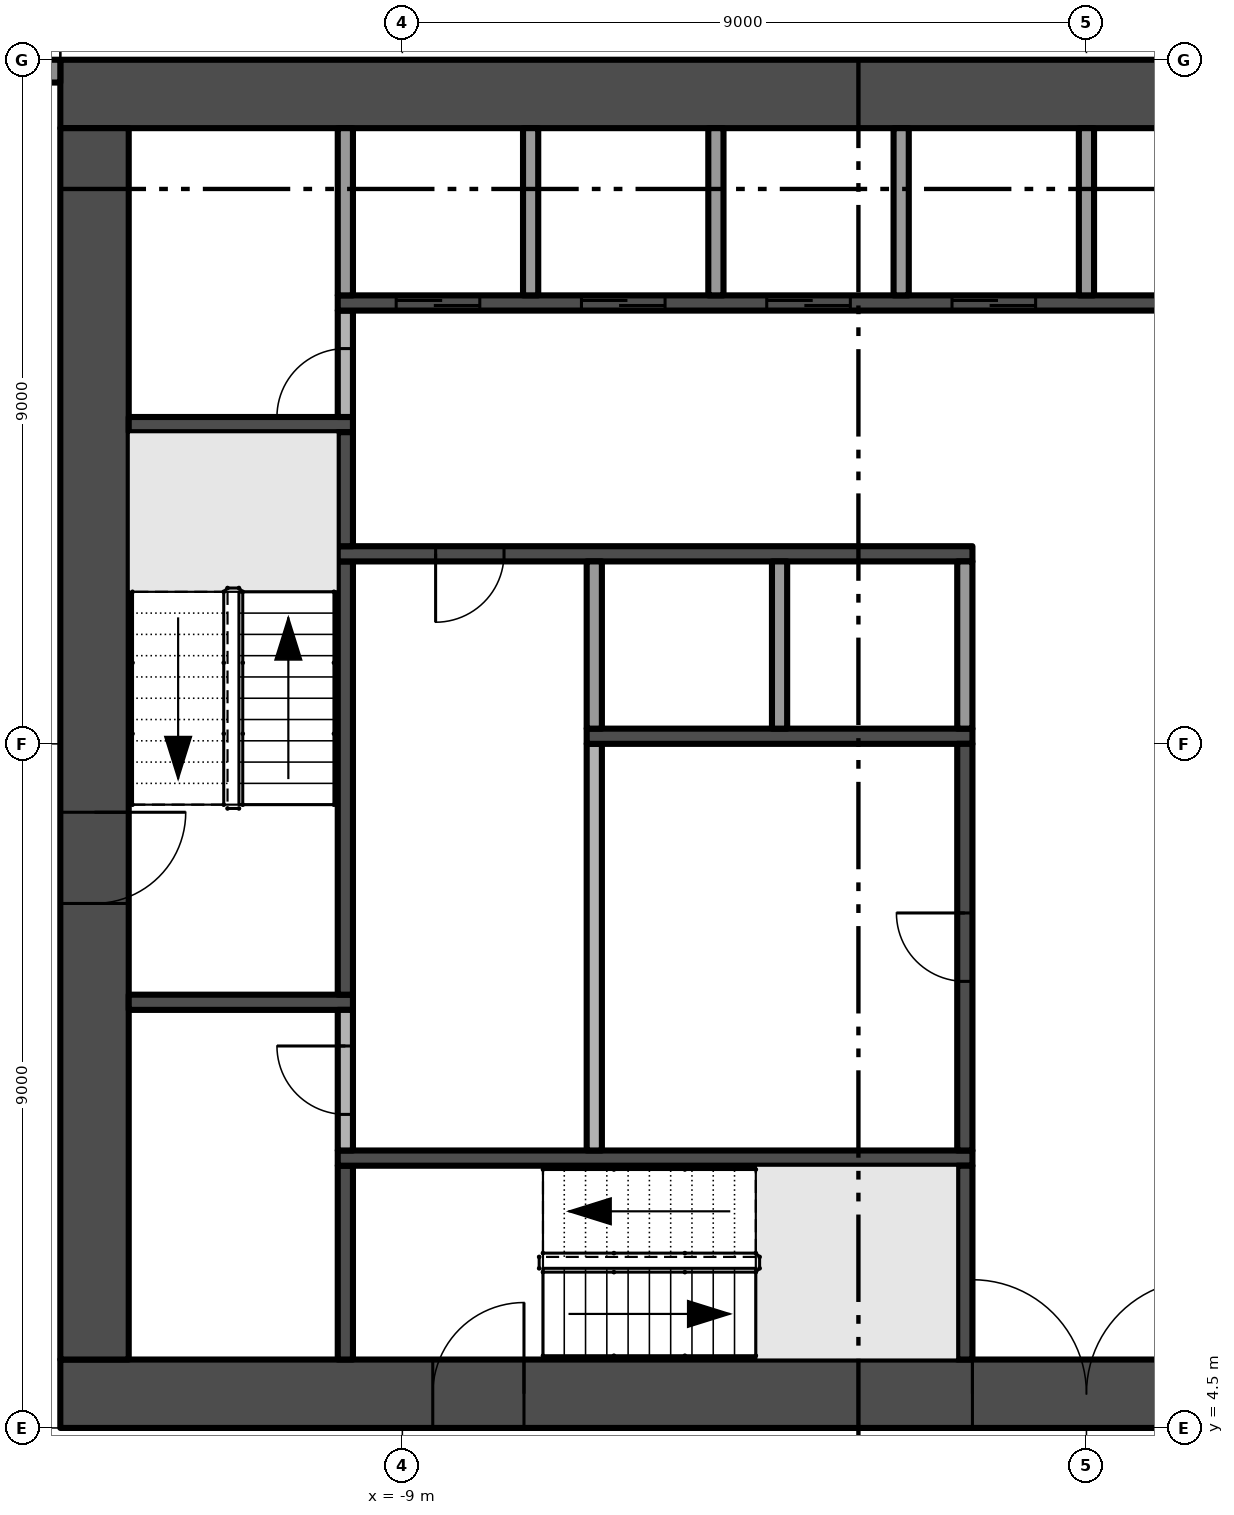
"""IFC4 building model, lengths in metres.
Left out: names, types, materials, properties, quantities, classifications, styles, units other than length and angle.
Written with IfcOpenShell. Run it as: python <this file> out.ifc"""

import sys

from ifc_helpers import new_model, si_unit, direction, frame, frame_2d, origin, place, context, subcontext, project, spatial, rectangle, extrude, element, fill, save


model = new_model("IFC4")
c1 = context("Model", 3, precision=1e-05, world=origin(), true_north=direction((0.0, 1.0)))
c2 = subcontext(c1, "Body", "Model", "MODEL_VIEW")
j1 = project(units=[si_unit("LENGTHUNIT", "METRE"), si_unit("PLANEANGLEUNIT", "RADIAN")], contexts=[c1])
p1 = place(None, origin())
s1 = spatial("IfcSite", under=j1, at=p1, CompositionType="ELEMENT")
p2 = place(p1, origin())
s2 = spatial("IfcBuilding", under=s1, at=p2, CompositionType="ELEMENT")
p3 = place(p2, frame((0.0, 0.0, 103.6)))
s3 = spatial("IfcBuildingStorey", under=s2, at=p3, CompositionType="ELEMENT", Elevation=103.6)
p4 = place(p3, frame((-13.5, 4.95, -0.3), z_axis=(0.0, 0.0, 1.0), x_axis=(1.0, 0.0, 0.0)))
e1 = element("IfcWall", 1, at=p4, inside=s3, PredefinedType="SHEAR", context=c2, shape_type="SweptSolid", body=[
    extrude(rectangle(XDim=27.0, YDim=0.9, at=frame_2d((13.5, 0.0))), origin(), (0.0, 0.0, 1.0), 3.8),
])
p5 = place(p4, frame((12.0, 0.0, 0.3)))
e2 = element("IfcOpeningElement", 2, at=p5, cuts=e1, PredefinedType="OPENING", context=c2, shape_type="SweptSolid", body=[
    extrude(rectangle(XDim=3.0, YDim=2.4, at=frame_2d((1.5, 1.2))), frame((0.0, 0.46, 0.0), z_axis=(0.0, -1.0, 0.0), x_axis=(1.0, 0.0, 0.0)), (0.0, 0.0, 1.0), 0.92),
])
p6 = place(p4, frame((4.9, 0.0, 0.3)))
e3 = element("IfcOpeningElement", 3, at=p6, cuts=e1, PredefinedType="OPENING", context=c2, shape_type="SweptSolid", body=[
    extrude(rectangle(XDim=1.2, YDim=2.2, at=frame_2d((0.6, 1.1))), frame((0.0, 0.46, 0.0), z_axis=(0.0, -1.0, 0.0), x_axis=(1.0, 0.0, 0.0)), (0.0, 0.0, 1.0), 0.92),
])
p7 = place(p4, frame((20.75, 0.0, 0.3)))
e4 = element("IfcOpeningElement", 4, at=p7, cuts=e1, PredefinedType="OPENING", context=c2, shape_type="SweptSolid", body=[
    extrude(rectangle(XDim=1.5, YDim=2.2, at=frame_2d((0.75, 1.1))), frame((0.0, 0.46, 0.0), z_axis=(0.0, -1.0, 0.0), x_axis=(1.0, 0.0, 0.0)), (0.0, 0.0, 1.0), 0.92),
])
p8 = place(p4, frame((17.4, 0.0, 0.3)))
e5 = element("IfcOpeningElement", 5, at=p8, cuts=e1, PredefinedType="OPENING", context=c2, shape_type="SweptSolid", body=[
    extrude(rectangle(XDim=1.2, YDim=2.2, at=frame_2d((0.6, 1.1))), frame((0.0, 0.46, 0.0), z_axis=(0.0, -1.0, 0.0), x_axis=(1.0, 0.0, 0.0)), (0.0, 0.0, 1.0), 0.92),
])
p9 = place(p3, frame((13.5, 22.05, -0.3), z_axis=(0.0, 0.0, 1.0), x_axis=(-1.0, 0.0, 0.0)))
e6 = element("IfcWall", 6, at=p9, inside=s3, PredefinedType="SHEAR", context=c2, shape_type="SweptSolid", body=[
    extrude(rectangle(XDim=27.0, YDim=0.9, at=frame_2d((13.5, 0.0))), origin(), (0.0, 0.0, 1.0), 3.8),
])
p10 = place(p3, frame((-13.05, 21.6, -0.3), z_axis=(0.0, 0.0, 1.0), x_axis=(0.0, -1.0, 0.0)))
e7 = element("IfcWall", 7, at=p10, inside=s3, PredefinedType="SHEAR", context=c2, shape_type="SweptSolid", body=[
    extrude(rectangle(XDim=16.2, YDim=0.9, at=frame_2d((8.1, 0.0))), origin(), (0.0, 0.0, 1.0), 3.8),
])
p11 = place(p10, frame((9.0, 0.0, 0.3)))
e8 = element("IfcOpeningElement", 8, at=p11, cuts=e7, PredefinedType="OPENING", context=c2, shape_type="SweptSolid", body=[
    extrude(rectangle(XDim=1.2, YDim=2.2, at=frame_2d((0.6, 1.1))), frame((0.0, 0.46, 0.0), z_axis=(0.0, -1.0, 0.0), x_axis=(1.0, 0.0, 0.0)), (0.0, 0.0, 1.0), 0.92),
])
p12 = place(p3, frame((-17.375, 22.35, 0.0), z_axis=(0.0, 0.0, 1.0), x_axis=(1.0, 0.0, 0.0)))
e9 = element("IfcWall", 9, at=p12, inside=s3, PredefinedType="SOLIDWALL", context=c2, shape_type="SweptSolid", body=[
    extrude(rectangle(XDim=3.875, YDim=0.3, at=frame_2d((1.938, 0.0))), origin(), (0.0, 0.0, 1.0), 3.5),
])
p13 = place(p12, frame((0.325, 0.0, 0.45)))
e10 = element("IfcOpeningElement", 10, at=p13, cuts=e9, PredefinedType="OPENING", context=c2, shape_type="SweptSolid", body=[
    extrude(rectangle(XDim=2.775, YDim=2.65, at=frame_2d((1.387, 1.325))), frame((0.0, 0.16, 0.0), z_axis=(0.0, -1.0, 0.0), x_axis=(1.0, 0.0, 0.0)), (0.0, 0.0, 1.0), 0.32),
])
for number, where, z_axis, x_axis in (
    (11, (-12.6, 10.1, 0.0), (0.0, 0.0, 1.0), (1.0, 0.0, 0.0)),
    (12, (-12.6, 17.7, 0.0), (0.0, 0.0, 1.0), (1.0, 0.0, 0.0)),
):
    element("IfcWall", number, at=place(p3, frame(where, z_axis=z_axis, x_axis=x_axis)), inside=s3, PredefinedType="SHEAR", context=c2, shape_type="SweptSolid", body=[
        extrude(rectangle(XDim=2.95, YDim=0.2, at=frame_2d((1.475, 0.0))), origin(), (0.0, 0.0, 1.0), 3.5),
    ])
p14 = place(p3, frame((-9.75, 5.4, 0.0), z_axis=(0.0, 0.0, 1.0), x_axis=(0.0, 1.0, 0.0)))
e13 = element("IfcWall", 13, at=p14, inside=s3, PredefinedType="SHEAR", context=c2, shape_type="SweptSolid", body=[
    extrude(rectangle(XDim=2.55, YDim=0.2, at=frame_2d((1.275, 0.0))), origin(), (0.0, 0.0, 1.0), 3.5),
])
p15 = place(p3, frame((-9.85, 8.05, 0.0), z_axis=(0.0, 0.0, 1.0), x_axis=(1.0, 0.0, 0.0)))
e14 = element("IfcWall", 14, at=p15, inside=s3, PredefinedType="SHEAR", context=c2, shape_type="SweptSolid", body=[
    extrude(rectangle(XDim=8.35, YDim=0.2, at=frame_2d((4.175, 0.0))), origin(), (0.0, 0.0, 1.0), 3.5),
])
p16 = place(p3, frame((-9.75, 8.15, 0.0), z_axis=(0.0, 0.0, 1.0), x_axis=(0.0, 1.0, 0.0)))
e15 = element("IfcWall", 15, at=p16, inside=s3, PredefinedType="PARTITIONING", context=c2, shape_type="SweptSolid", body=[
    extrude(rectangle(XDim=1.85, YDim=0.2, at=frame_2d((0.925, 0.0))), origin(), (0.0, 0.0, 1.0), 3.5),
])
p17 = place(p16, frame((0.475, 0.0, 0.0)))
e16 = element("IfcOpeningElement", 16, at=p17, cuts=e15, PredefinedType="OPENING", context=c2, shape_type="SweptSolid", body=[
    extrude(rectangle(XDim=0.9, YDim=2.1, at=frame_2d((0.45, 1.05))), frame((0.0, 0.11, 0.0), z_axis=(0.0, -1.0, 0.0), x_axis=(1.0, 0.0, 0.0)), (0.0, 0.0, 1.0), 0.22),
])
p18 = place(p3, frame((-9.75, 10.2, 0.0), z_axis=(0.0, 0.0, 1.0), x_axis=(0.0, 1.0, 0.0)))
e17 = element("IfcWall", 17, at=p18, inside=s3, PredefinedType="SHEAR", context=c2, shape_type="SweptSolid", body=[
    extrude(rectangle(XDim=5.7, YDim=0.2, at=frame_2d((2.85, 0.0))), origin(), (0.0, 0.0, 1.0), 3.5),
])
p19 = place(p3, frame((-1.5, 16.0, 0.0), z_axis=(0.0, 0.0, 1.0), x_axis=(-1.0, 0.0, 0.0)))
e18 = element("IfcWall", 18, at=p19, inside=s3, PredefinedType="SHEAR", context=c2, shape_type="SweptSolid", body=[
    extrude(rectangle(XDim=8.35, YDim=0.2, at=frame_2d((4.175, 0.0))), origin(), (0.0, 0.0, 1.0), 3.5),
])
p20 = place(p19, frame((6.162, 0.0, 0.0)))
e19 = element("IfcOpeningElement", 19, at=p20, cuts=e18, PredefinedType="OPENING", context=c2, shape_type="SweptSolid", body=[
    extrude(rectangle(XDim=0.9, YDim=2.1, at=frame_2d((0.45, 1.05))), frame((0.0, 0.11, 0.0), z_axis=(0.0, -1.0, 0.0), x_axis=(1.0, 0.0, 0.0)), (0.0, 0.0, 1.0), 0.22),
])
p21 = place(p3, frame((-9.75, 16.1, 0.0), z_axis=(0.0, 0.0, 1.0), x_axis=(0.0, 1.0, 0.0)))
e20 = element("IfcWall", 20, at=p21, inside=s3, PredefinedType="SHEAR", context=c2, shape_type="SweptSolid", body=[
    extrude(rectangle(XDim=1.5, YDim=0.2, at=frame_2d((0.75, 0.0))), origin(), (0.0, 0.0, 1.0), 3.5),
])
p22 = place(p3, frame((-9.75, 17.8, 0.0), z_axis=(0.0, 0.0, 1.0), x_axis=(0.0, 1.0, 0.0)))
e21 = element("IfcWall", 21, at=p22, inside=s3, PredefinedType="PARTITIONING", context=c2, shape_type="SweptSolid", body=[
    extrude(rectangle(XDim=1.4, YDim=0.2, at=frame_2d((0.7, 0.0))), origin(), (0.0, 0.0, 1.0), 3.5),
])
p23 = place(p22, origin())
e22 = element("IfcOpeningElement", 22, at=p23, cuts=e21, PredefinedType="OPENING", context=c2, shape_type="SweptSolid", body=[
    extrude(rectangle(XDim=0.9, YDim=2.1, at=frame_2d((0.45, 1.05))), frame((0.0, 0.11, 0.0), z_axis=(0.0, -1.0, 0.0), x_axis=(1.0, 0.0, 0.0)), (0.0, 0.0, 1.0), 0.22),
])
p24 = place(p3, frame((-9.85, 19.3, 0.0), z_axis=(0.0, 0.0, 1.0), x_axis=(1.0, 0.0, 0.0)))
e23 = element("IfcWall", 23, at=p24, inside=s3, PredefinedType="SHEAR", context=c2, shape_type="SweptSolid", body=[
    extrude(rectangle(XDim=19.7, YDim=0.2, at=frame_2d((9.85, 0.0))), origin(), (0.0, 0.0, 1.0), 3.5),
])
p25 = place(p24, frame((0.769, 0.0, 0.0)))
e24 = element("IfcOpeningElement", 24, at=p25, cuts=e23, PredefinedType="OPENING", context=c2, shape_type="SweptSolid", body=[
    extrude(rectangle(XDim=1.1, YDim=2.1, at=frame_2d((0.55, 1.05))), frame((0.0, 0.11, 0.0), z_axis=(0.0, -1.0, 0.0), x_axis=(1.0, 0.0, 0.0)), (0.0, 0.0, 1.0), 0.22),
])
p26 = place(p24, frame((3.206, 0.0, 0.0)))
e25 = element("IfcOpeningElement", 25, at=p26, cuts=e23, PredefinedType="OPENING", context=c2, shape_type="SweptSolid", body=[
    extrude(rectangle(XDim=1.1, YDim=2.1, at=frame_2d((0.55, 1.05))), frame((0.0, 0.11, 0.0), z_axis=(0.0, -1.0, 0.0), x_axis=(1.0, 0.0, 0.0)), (0.0, 0.0, 1.0), 0.22),
])
p27 = place(p24, frame((5.644, 0.0, 0.0)))
e26 = element("IfcOpeningElement", 26, at=p27, cuts=e23, PredefinedType="OPENING", context=c2, shape_type="SweptSolid", body=[
    extrude(rectangle(XDim=1.1, YDim=2.1, at=frame_2d((0.55, 1.05))), frame((0.0, 0.11, 0.0), z_axis=(0.0, -1.0, 0.0), x_axis=(1.0, 0.0, 0.0)), (0.0, 0.0, 1.0), 0.22),
])
p28 = place(p24, frame((8.081, 0.0, 0.0)))
e27 = element("IfcOpeningElement", 27, at=p28, cuts=e23, PredefinedType="OPENING", context=c2, shape_type="SweptSolid", body=[
    extrude(rectangle(XDim=1.1, YDim=2.1, at=frame_2d((0.55, 1.05))), frame((0.0, 0.11, 0.0), z_axis=(0.0, -1.0, 0.0), x_axis=(1.0, 0.0, 0.0)), (0.0, 0.0, 1.0), 0.22),
])
for number, where, z_axis, x_axis in (
    (28, (-9.75, 19.4, 0.0), (0.0, 0.0, 1.0), (0.0, 1.0, 0.0)),
    (29, (-7.312, 19.4, 0.0), (0.0, 0.0, 1.0), (0.0, 1.0, 0.0)),
):
    element("IfcWall", number, at=place(p3, frame(where, z_axis=z_axis, x_axis=x_axis)), inside=s3, PredefinedType="PARTITIONING", context=c2, shape_type="SweptSolid", body=[
        extrude(rectangle(XDim=2.2, YDim=0.2, at=frame_2d((1.1, 0.0))), origin(), (0.0, 0.0, 1.0), 3.5),
    ])
p29 = place(p3, frame((-6.475, 8.15, 0.0), z_axis=(0.0, 0.0, 1.0), x_axis=(0.0, 1.0, 0.0)))
e30 = element("IfcWall", 30, at=p29, inside=s3, PredefinedType="PARTITIONING", context=c2, shape_type="SweptSolid", body=[
    extrude(rectangle(XDim=5.35, YDim=0.2, at=frame_2d((2.675, 0.0))), origin(), (0.0, 0.0, 1.0), 3.5),
])
p30 = place(p3, frame((-6.575, 13.6, 0.0), z_axis=(0.0, 0.0, 1.0), x_axis=(1.0, 0.0, 0.0)))
e31 = element("IfcWall", 31, at=p30, inside=s3, PredefinedType="SHEAR", context=c2, shape_type="SweptSolid", body=[
    extrude(rectangle(XDim=5.075, YDim=0.2, at=frame_2d((2.538, 0.0))), origin(), (0.0, 0.0, 1.0), 3.5),
])
for number, where, z_axis, x_axis in (
    (32, (-6.475, 13.7, 0.0), (0.0, 0.0, 1.0), (0.0, 1.0, 0.0)),
    (33, (-4.875, 19.4, 0.0), (0.0, 0.0, 1.0), (0.0, 1.0, 0.0)),
    (34, (-4.037, 13.7, 0.0), (0.0, 0.0, 1.0), (0.0, 1.0, 0.0)),
    (35, (-2.438, 19.4, 0.0), (0.0, 0.0, 1.0), (0.0, 1.0, 0.0)),
):
    element("IfcWall", number, at=place(p3, frame(where, z_axis=z_axis, x_axis=x_axis)), inside=s3, PredefinedType="PARTITIONING", context=c2, shape_type="SweptSolid", body=[
        extrude(rectangle(XDim=2.2, YDim=0.2, at=frame_2d((1.1, 0.0))), origin(), (0.0, 0.0, 1.0), 3.5),
    ])
p31 = place(p3, frame((-1.6, 5.4, 0.0), z_axis=(0.0, 0.0, 1.0), x_axis=(0.0, 1.0, 0.0)))
e36 = element("IfcWall", 36, at=p31, inside=s3, PredefinedType="SHEAR", context=c2, shape_type="SweptSolid", body=[
    extrude(rectangle(XDim=2.55, YDim=0.2, at=frame_2d((1.275, 0.0))), origin(), (0.0, 0.0, 1.0), 3.5),
])
p32 = place(p3, frame((-1.6, 8.15, 0.0), z_axis=(0.0, 0.0, 1.0), x_axis=(0.0, 1.0, 0.0)))
e37 = element("IfcWall", 37, at=p32, inside=s3, PredefinedType="SHEAR", context=c2, shape_type="SweptSolid", body=[
    extrude(rectangle(XDim=5.35, YDim=0.2, at=frame_2d((2.675, 0.0))), origin(), (0.0, 0.0, 1.0), 3.5),
])
p33 = place(p32, frame((2.225, 0.0, 0.0)))
e38 = element("IfcOpeningElement", 38, at=p33, cuts=e37, PredefinedType="OPENING", context=c2, shape_type="SweptSolid", body=[
    extrude(rectangle(XDim=0.9, YDim=2.1, at=frame_2d((0.45, 1.05))), frame((0.0, 0.11, 0.0), z_axis=(0.0, -1.0, 0.0), x_axis=(1.0, 0.0, 0.0)), (0.0, 0.0, 1.0), 0.22),
])
for number, where, z_axis, x_axis in (
    (39, (-1.6, 13.7, 0.0), (0.0, 0.0, 1.0), (0.0, 1.0, 0.0)),
    (40, (0.0, 19.4, 0.0), (0.0, 0.0, 1.0), (0.0, 1.0, 0.0)),
):
    element("IfcWall", number, at=place(p3, frame(where, z_axis=z_axis, x_axis=x_axis)), inside=s3, PredefinedType="PARTITIONING", context=c2, shape_type="SweptSolid", body=[
        extrude(rectangle(XDim=2.2, YDim=0.2, at=frame_2d((1.1, 0.0))), origin(), (0.0, 0.0, 1.0), 3.5),
    ])
p34 = place(p5, frame((3.0, 0.0, 0.0), z_axis=(0.0, 0.0, 1.0), x_axis=(-1.0, 0.0, 0.0)))
e41 = element("IfcDoor", 41, at=p34, inside=s3, OperationType="DOUBLE_DOOR_SINGLE_SWING", PredefinedType="DOOR", context=c2, shape_type="SweptSolid", body=[
    extrude(rectangle(XDim=3.0, YDim=2.4, at=frame_2d((1.5, 1.2))), frame((0.0, 0.025, 0.0), z_axis=(0.0, -1.0, 0.0), x_axis=(1.0, 0.0, 0.0)), (0.0, 0.0, 1.0), 0.05),
])
fill(e2, e41)
p35 = place(p11, frame((1.2, 0.0, 0.0), z_axis=(0.0, 0.0, 1.0), x_axis=(-1.0, 0.0, 0.0)))
e42 = element("IfcDoor", 42, at=p35, inside=s3, OperationType="SINGLE_SWING_RIGHT", PredefinedType="DOOR", context=c2, shape_type="SweptSolid", body=[
    extrude(rectangle(XDim=1.2, YDim=2.2, at=frame_2d((0.6, 1.1))), frame((0.0, 0.025, 0.0), z_axis=(0.0, -1.0, 0.0), x_axis=(1.0, 0.0, 0.0)), (0.0, 0.0, 1.0), 0.05),
])
fill(e8, e42)
p36 = place(p6, frame((1.2, 0.0, 0.0), z_axis=(0.0, 0.0, 1.0), x_axis=(-1.0, 0.0, 0.0)))
e43 = element("IfcDoor", 43, at=p36, inside=s3, OperationType="SINGLE_SWING_LEFT", PredefinedType="DOOR", context=c2, shape_type="SweptSolid", body=[
    extrude(rectangle(XDim=1.2, YDim=2.2, at=frame_2d((0.6, 1.1))), frame((0.0, 0.025, 0.0), z_axis=(0.0, -1.0, 0.0), x_axis=(1.0, 0.0, 0.0)), (0.0, 0.0, 1.0), 0.05),
])
fill(e3, e43)
p37 = place(p25, origin())
e44 = element("IfcDoor", 44, at=p37, inside=s3, OperationType="SLIDING_TO_LEFT", PredefinedType="DOOR", context=c2, shape_type="SweptSolid", body=[
    extrude(rectangle(XDim=1.1, YDim=2.1, at=frame_2d((0.55, 1.05))), frame((0.0, 0.025, 0.0), z_axis=(0.0, -1.0, 0.0), x_axis=(1.0, 0.0, 0.0)), (0.0, 0.0, 1.0), 0.05),
])
fill(e24, e44)
p38 = place(p26, origin())
e45 = element("IfcDoor", 45, at=p38, inside=s3, OperationType="SLIDING_TO_LEFT", PredefinedType="DOOR", context=c2, shape_type="SweptSolid", body=[
    extrude(rectangle(XDim=1.1, YDim=2.1, at=frame_2d((0.55, 1.05))), frame((0.0, 0.025, 0.0), z_axis=(0.0, -1.0, 0.0), x_axis=(1.0, 0.0, 0.0)), (0.0, 0.0, 1.0), 0.05),
])
fill(e25, e45)
p39 = place(p27, origin())
e46 = element("IfcDoor", 46, at=p39, inside=s3, OperationType="SLIDING_TO_LEFT", PredefinedType="DOOR", context=c2, shape_type="SweptSolid", body=[
    extrude(rectangle(XDim=1.1, YDim=2.1, at=frame_2d((0.55, 1.05))), frame((0.0, 0.025, 0.0), z_axis=(0.0, -1.0, 0.0), x_axis=(1.0, 0.0, 0.0)), (0.0, 0.0, 1.0), 0.05),
])
fill(e26, e46)
p40 = place(p28, origin())
e47 = element("IfcDoor", 47, at=p40, inside=s3, OperationType="SLIDING_TO_LEFT", PredefinedType="DOOR", context=c2, shape_type="SweptSolid", body=[
    extrude(rectangle(XDim=1.1, YDim=2.1, at=frame_2d((0.55, 1.05))), frame((0.0, 0.025, 0.0), z_axis=(0.0, -1.0, 0.0), x_axis=(1.0, 0.0, 0.0)), (0.0, 0.0, 1.0), 0.05),
])
fill(e27, e47)
p41 = place(p20, origin())
e48 = element("IfcDoor", 48, at=p41, inside=s3, OperationType="SINGLE_SWING_RIGHT", PredefinedType="DOOR", context=c2, shape_type="SweptSolid", body=[
    extrude(rectangle(XDim=0.9, YDim=2.1, at=frame_2d((0.45, 1.05))), frame((0.0, 0.025, 0.0), z_axis=(0.0, -1.0, 0.0), x_axis=(1.0, 0.0, 0.0)), (0.0, 0.0, 1.0), 0.05),
])
fill(e19, e48)
p42 = place(p33, origin())
e49 = element("IfcDoor", 49, at=p42, inside=s3, OperationType="SINGLE_SWING_RIGHT", PredefinedType="DOOR", context=c2, shape_type="SweptSolid", body=[
    extrude(rectangle(XDim=0.9, YDim=2.1, at=frame_2d((0.45, 1.05))), frame((0.0, 0.025, 0.0), z_axis=(0.0, -1.0, 0.0), x_axis=(1.0, 0.0, 0.0)), (0.0, 0.0, 1.0), 0.05),
])
fill(e38, e49)
p43 = place(p23, origin())
e50 = element("IfcDoor", 50, at=p43, inside=s3, OperationType="SINGLE_SWING_LEFT", PredefinedType="DOOR", context=c2, shape_type="SweptSolid", body=[
    extrude(rectangle(XDim=0.9, YDim=2.1, at=frame_2d((0.45, 1.05))), frame((0.0, 0.025, 0.0), z_axis=(0.0, -1.0, 0.0), x_axis=(1.0, 0.0, 0.0)), (0.0, 0.0, 1.0), 0.05),
])
fill(e22, e50)
p44 = place(p17, origin())
e51 = element("IfcDoor", 51, at=p44, inside=s3, OperationType="SINGLE_SWING_RIGHT", PredefinedType="DOOR", context=c2, shape_type="SweptSolid", body=[
    extrude(rectangle(XDim=0.9, YDim=2.1, at=frame_2d((0.45, 1.05))), frame((0.0, 0.025, 0.0), z_axis=(0.0, -1.0, 0.0), x_axis=(1.0, 0.0, 0.0)), (0.0, 0.0, 1.0), 0.05),
])
fill(e16, e51)
save(model, sys.argv[1])
